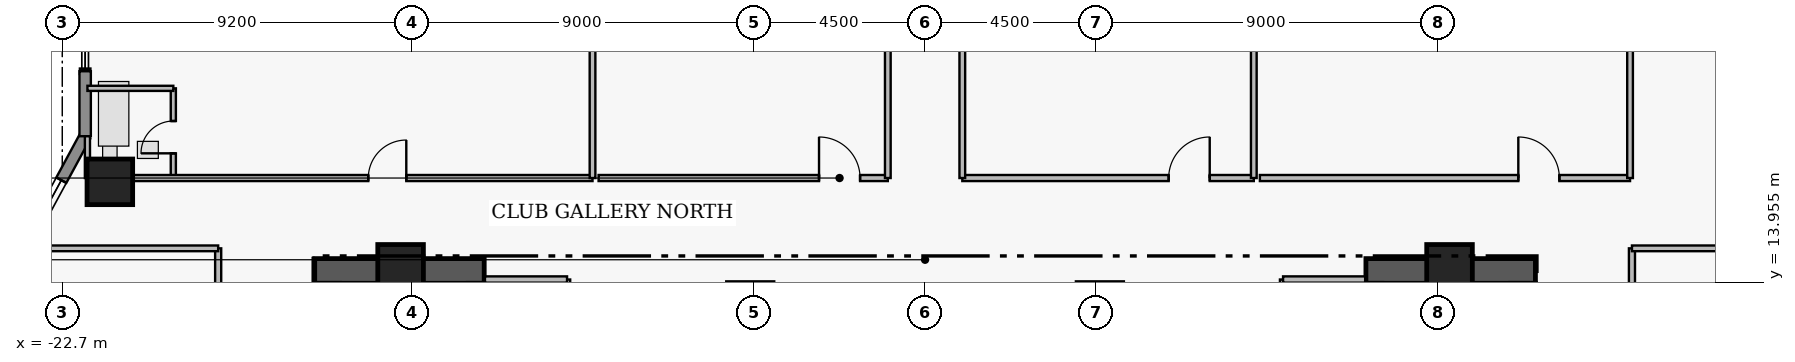
"""IFC4 building model, lengths in metres.
Left out: names, types, materials, properties, quantities, classifications, styles, units other than length and angle.
Written with IfcOpenShell. Run it as: python <this file> out.ifc"""

import sys

from ifc_helpers import new_model, si_unit, direction, frame, frame_2d, origin, origin_2d, place, context, subcontext, project, spatial, rectangle, extrude, element, fill, save


model = new_model("IFC4")
c1 = context("Model", 3, precision=1e-05, world=origin(), true_north=direction((0.0, 1.0)))
c2 = subcontext(c1, "Body", "Model", "MODEL_VIEW")
j1 = project(units=[si_unit("LENGTHUNIT", "METRE"), si_unit("PLANEANGLEUNIT", "RADIAN")], contexts=[c1])
p1 = place(None, origin())
s1 = spatial("IfcSite", under=j1, at=p1, CompositionType="ELEMENT")
p2 = place(p1, origin())
s2 = spatial("IfcBuilding", under=s1, at=p2, CompositionType="ELEMENT")
p3 = place(p2, frame((0.0, 0.0, 192.4)))
s3 = spatial("IfcBuildingStorey", under=s2, at=p3, CompositionType="ELEMENT", Elevation=192.4)
for number, where, z_axis, x_axis in (
    (1, (-16.06, 14.255, 0.0), (0.0, 0.0, 1.0), (1.0, 0.0, 0.0)),
    (2, (11.6, 14.255, 0.0), (0.0, 0.0, 1.0), (1.0, 0.0, 0.0)),
):
    element("IfcWall", number, at=place(p3, frame(where, z_axis=z_axis, x_axis=x_axis)), inside=s3, PredefinedType="SHEAR", context=c2, shape_type="SweptSolid", body=[
        extrude(rectangle(XDim=4.46, YDim=0.65, at=frame_2d((2.23, 0.0))), origin(), (0.0, 0.0, 1.0), 3.56),
    ])
for number, where, z_axis, x_axis in (
    (3, (-13.8, 14.35, 0.0), (0.0, 0.0, 1.0), (1.0, 0.0, 0.0)),
    (4, (-4.6, 13.35, 0.0), (0.0, 0.0, 1.0), (1.0, 0.0, 0.0)),
    (5, (4.6, 13.35, 0.0), (0.0, 0.0, 1.0), (1.0, 0.0, 0.0)),
    (6, (13.8, 14.35, 0.0), (0.0, 0.0, 1.0), (1.0, 0.0, 0.0)),
    (7, (-21.45, 16.6, 0.0), (0.0, 0.0, 1.0), (1.0, 0.0, 0.0)),
):
    element("IfcColumn", number, at=place(p3, frame(where, z_axis=z_axis, x_axis=x_axis)), inside=s3, PredefinedType="COLUMN", context=c2, shape_type="SweptSolid", body=[
        extrude(rectangle(XDim=1.2, YDim=1.2, at=origin_2d()), origin(), (0.0, 0.0, 1.0), 3.75),
    ])
p4 = place(p3, frame((-24.7, 13.0, 0.0), z_axis=(0.0, 0.0, 1.0), x_axis=(0.476258655584, 0.879305233114, 0.0)))
e8 = element("IfcWall", 8, at=p4, inside=s3, PredefinedType="STANDARD", context=c2, shape_type="SweptSolid", body=[
    extrude(rectangle(XDim=5.459, YDim=0.3, at=frame_2d((2.729, 0.0))), origin(), (0.0, 0.0, 1.0), 3.53),
])
p5 = place(p4, frame((2.993, 0.0, 1.25)))
e9 = element("IfcOpeningElement", 9, at=p5, cuts=e8, PredefinedType="OPENING", context=c2, shape_type="SweptSolid", body=[
    extrude(rectangle(XDim=1.15, YDim=1.55, at=frame_2d((0.575, 0.775))), frame((0.0, 0.16, 0.0), z_axis=(0.0, -1.0, 0.0), x_axis=(1.0, 0.0, 0.0)), (0.0, 0.0, 1.0), 0.32),
])
p6 = place(p3, frame((-22.1, 17.8, 0.0), z_axis=(0.0, 0.0, 1.0), x_axis=(0.0, 1.0, 0.0)))
e10 = element("IfcWall", 10, at=p6, inside=s3, PredefinedType="STANDARD", context=c2, shape_type="SweptSolid", body=[
    extrude(rectangle(XDim=1.71, YDim=0.3, at=frame_2d((0.855, 0.0))), origin(), (0.0, 0.0, 1.0), 3.53),
])
p7 = place(p3, frame((-19.78, 16.7, 0.0), z_axis=(0.0, 0.0, 1.0), x_axis=(0.0, 1.0, 0.0)))
e11 = element("IfcWall", 11, at=p7, inside=s3, PredefinedType="PLUMBINGWALL", context=c2, shape_type="SweptSolid", body=[
    extrude(rectangle(XDim=2.36, YDim=0.135, at=frame_2d((1.18, 0.0))), origin(), (0.0, 0.0, 1.0), 3.53),
])
p8 = place(p7, frame((0.65, 0.0, 0.0)))
e12 = element("IfcOpeningElement", 12, at=p8, cuts=e11, PredefinedType="OPENING", context=c2, shape_type="SweptSolid", body=[
    extrude(rectangle(XDim=0.85, YDim=2.1, at=frame_2d((0.425, 1.05))), frame((0.0, 0.077, 0.0), z_axis=(0.0, -1.0, 0.0), x_axis=(1.0, 0.0, 0.0)), (0.0, 0.0, 1.0), 0.155),
])
p9 = place(p3, frame((-22.04, 16.7, 0.0), z_axis=(0.0, 0.0, 1.0), x_axis=(1.0, 0.0, 0.0)))
e13 = element("IfcWall", 13, at=p9, inside=s3, PredefinedType="PARTITIONING", context=c2, shape_type="SweptSolid", body=[
    extrude(rectangle(XDim=13.29, YDim=0.16, at=frame_2d((6.645, 0.0))), origin(), (0.0, 0.0, 1.0), 3.124),
])
p10 = place(p9, frame((7.39, 0.0, 0.0)))
e14 = element("IfcOpeningElement", 14, at=p10, cuts=e13, PredefinedType="OPENING", context=c2, shape_type="SweptSolid", body=[
    extrude(rectangle(XDim=1.0, YDim=2.15, at=frame_2d((0.5, 1.075))), frame((0.0, 0.09, 0.0), z_axis=(0.0, -1.0, 0.0), x_axis=(1.0, 0.0, 0.0)), (0.0, 0.0, 1.0), 0.18),
])
p11 = place(p3, frame((-8.59, 16.7, 0.0), z_axis=(0.0, 0.0, 1.0), x_axis=(1.0, 0.0, 0.0)))
e15 = element("IfcWall", 15, at=p11, inside=s3, PredefinedType="PARTITIONING", context=c2, shape_type="SweptSolid", body=[
    extrude(rectangle(XDim=7.61, YDim=0.16, at=frame_2d((3.805, 0.0))), origin(), (0.0, 0.0, 1.0), 3.124),
])
p12 = place(p11, frame((5.8, 0.0, 0.0)))
e16 = element("IfcOpeningElement", 16, at=p12, cuts=e15, PredefinedType="OPENING", context=c2, shape_type="SweptSolid", body=[
    extrude(rectangle(XDim=1.08, YDim=2.18, at=frame_2d((0.54, 1.09))), frame((0.0, 0.09, 0.0), z_axis=(0.0, -1.0, 0.0), x_axis=(1.0, 0.0, 0.0)), (0.0, 0.0, 1.0), 0.18),
])
p13 = place(p3, frame((0.98, 16.7, 0.0), z_axis=(0.0, 0.0, 1.0), x_axis=(1.0, 0.0, 0.0)))
e17 = element("IfcWall", 17, at=p13, inside=s3, PredefinedType="PARTITIONING", context=c2, shape_type="SweptSolid", body=[
    extrude(rectangle(XDim=7.67, YDim=0.16, at=frame_2d((3.835, 0.0))), origin(), (0.0, 0.0, 1.0), 3.124),
])
p14 = place(p13, frame((5.43, 0.0, 0.0)))
e18 = element("IfcOpeningElement", 18, at=p14, cuts=e17, PredefinedType="OPENING", context=c2, shape_type="SweptSolid", body=[
    extrude(rectangle(XDim=1.08, YDim=2.18, at=frame_2d((0.54, 1.09))), frame((0.0, 0.09, 0.0), z_axis=(0.0, -1.0, 0.0), x_axis=(1.0, 0.0, 0.0)), (0.0, 0.0, 1.0), 0.18),
])
p15 = place(p3, frame((8.81, 16.7, 0.0), z_axis=(0.0, 0.0, 1.0), x_axis=(1.0, 0.0, 0.0)))
e19 = element("IfcWall", 19, at=p15, inside=s3, PredefinedType="PARTITIONING", context=c2, shape_type="SweptSolid", body=[
    extrude(rectangle(XDim=9.74, YDim=0.16, at=frame_2d((4.87, 0.0))), origin(), (0.0, 0.0, 1.0), 3.124),
])
p16 = place(p15, frame((6.8, 0.0, 0.0)))
e20 = element("IfcOpeningElement", 20, at=p16, cuts=e19, PredefinedType="OPENING", context=c2, shape_type="SweptSolid", body=[
    extrude(rectangle(XDim=1.08, YDim=2.18, at=frame_2d((0.54, 1.09))), frame((0.0, 0.09, 0.0), z_axis=(0.0, -1.0, 0.0), x_axis=(1.0, 0.0, 0.0)), (0.0, 0.0, 1.0), 0.18),
])
p17 = place(p3, frame((18.6, 6.91, 0.0), z_axis=(0.0, 0.0, 1.0), x_axis=(0.0, 1.0, 0.0)))
e21 = element("IfcWall", 21, at=p17, inside=s3, PredefinedType="PARTITIONING", context=c2, shape_type="SweptSolid", body=[
    extrude(rectangle(XDim=7.94, YDim=0.16, at=frame_2d((3.97, 0.0))), origin(), (0.0, 0.0, 1.0), 3.53),
])
p18 = place(p17, frame((3.51, 0.0, 0.0)))
e22 = element("IfcOpeningElement", 22, at=p18, cuts=e21, PredefinedType="OPENING", context=c2, shape_type="SweptSolid", body=[
    extrude(rectangle(XDim=0.92, YDim=2.12, at=frame_2d((0.46, 1.06))), frame((0.0, 0.09, 0.0), z_axis=(0.0, -1.0, 0.0), x_axis=(1.0, 0.0, 0.0)), (0.0, 0.0, 1.0), 0.18),
])
p19 = place(p3, frame((-18.6, 10.18, 0.0), z_axis=(0.0, 0.0, 1.0), x_axis=(0.0, 1.0, 0.0)))
e23 = element("IfcWall", 23, at=p19, inside=s3, PredefinedType="PARTITIONING", context=c2, shape_type="SweptSolid", body=[
    extrude(rectangle(XDim=4.67, YDim=0.16, at=frame_2d((2.335, 0.0))), origin(), (0.0, 0.0, 1.0), 3.53),
])
p20 = place(p19, frame((1.86, 0.0, 0.0)))
e24 = element("IfcOpeningElement", 24, at=p20, cuts=e23, PredefinedType="OPENING", context=c2, shape_type="SweptSolid", body=[
    extrude(rectangle(XDim=0.95, YDim=2.15, at=frame_2d((0.475, 1.075))), frame((0.0, 0.09, 0.0), z_axis=(0.0, -1.0, 0.0), x_axis=(1.0, 0.0, 0.0)), (0.0, 0.0, 1.0), 0.18),
])
p21 = place(p3, frame((-9.42, 11.07, 0.0), z_axis=(0.0, 0.0, 1.0), x_axis=(0.0, 1.0, 0.0)))
e25 = element("IfcWall", 25, at=p21, inside=s3, PredefinedType="PARTITIONING", context=c2, shape_type="SweptSolid", body=[
    extrude(rectangle(XDim=2.96, YDim=0.165, at=frame_2d((1.48, 0.0))), origin(), (0.0, 0.0, 1.0), 3.53),
])
p22 = place(p3, frame((-11.58, 14.03, 0.0), z_axis=(0.0, 0.0, 1.0), x_axis=(1.0, 0.0, 0.0)))
e26 = element("IfcWall", 26, at=p22, inside=s3, PredefinedType="PARTITIONING", context=c2, shape_type="SweptSolid", body=[
    extrude(rectangle(XDim=2.16, YDim=0.165, at=frame_2d((1.08, 0.0))), origin(), (0.0, 0.0, 1.0), 3.53),
])
p23 = place(p3, frame((9.42, 11.07, 0.0), z_axis=(0.0, 0.0, 1.0), x_axis=(0.0, 1.0, 0.0)))
e27 = element("IfcWall", 27, at=p23, inside=s3, PredefinedType="PARTITIONING", context=c2, shape_type="SweptSolid", body=[
    extrude(rectangle(XDim=2.96, YDim=0.165, at=frame_2d((1.48, 0.0))), origin(), (0.0, 0.0, 1.0), 3.53),
])
p24 = place(p3, frame((9.42, 14.03, 0.0), z_axis=(0.0, 0.0, 1.0), x_axis=(1.0, 0.0, 0.0)))
e28 = element("IfcWall", 28, at=p24, inside=s3, PredefinedType="PARTITIONING", context=c2, shape_type="SweptSolid", body=[
    extrude(rectangle(XDim=2.16, YDim=0.165, at=frame_2d((1.08, 0.0))), origin(), (0.0, 0.0, 1.0), 3.53),
])
p25 = place(p3, frame((-22.04, 19.06, 0.0), z_axis=(0.0, 0.0, 1.0), x_axis=(1.0, 0.0, 0.0)))
e29 = element("IfcWall", 29, at=p25, inside=s3, PredefinedType="PLUMBINGWALL", context=c2, shape_type="SweptSolid", body=[
    extrude(rectangle(XDim=2.26, YDim=0.135, at=frame_2d((1.13, 0.0))), origin(), (0.0, 0.0, 1.0), 3.53),
])
p26 = place(p3, frame((-22.04, 16.7, 0.0), z_axis=(0.0, 0.0, 1.0), x_axis=(0.0, 1.0, 0.0)))
e30 = element("IfcWall", 30, at=p26, inside=s3, PredefinedType="PLUMBINGWALL", context=c2, shape_type="SweptSolid", body=[
    extrude(rectangle(XDim=1.1, YDim=0.135, at=frame_2d((0.55, 0.0))), origin(), (0.0, 0.0, 1.0), 3.53),
])
for number, where, z_axis, x_axis in (
    (31, (-8.75, 16.7, 0.0), (0.0, 0.0, 1.0), (0.0, 1.0, 0.0)),
    (32, (-0.98, 16.7, 0.0), (0.0, 0.0, 1.0), (0.0, 1.0, 0.0)),
    (33, (0.98, 16.7, 0.0), (0.0, 0.0, 1.0), (0.0, 1.0, 0.0)),
    (34, (8.65, 16.7, 0.0), (0.0, 0.0, 1.0), (0.0, 1.0, 0.0)),
    (35, (18.55, 16.7, 0.0), (0.0, 0.0, 1.0), (0.0, 1.0, 0.0)),
):
    element("IfcWall", number, at=place(p3, frame(where, z_axis=z_axis, x_axis=x_axis)), inside=s3, PredefinedType="PARTITIONING", context=c2, shape_type="SweptSolid", body=[
        extrude(rectangle(XDim=8.3, YDim=0.15, at=frame_2d((4.15, 0.0))), origin(), (0.0, 0.0, 1.0), 3.53),
    ])
for number, where, z_axis, x_axis in (
    (36, (18.6, 14.85, 0.0), (0.0, 0.0, 1.0), (1.0, 0.0, 0.0)),
    (37, (-23.638, 14.85, 0.0), (0.0, 0.0, 1.0), (1.0, 0.0, 0.0)),
):
    element("IfcWall", number, at=place(p3, frame(where, z_axis=z_axis, x_axis=x_axis)), inside=s3, PredefinedType="PARTITIONING", context=c2, shape_type="SweptSolid", body=[
        extrude(rectangle(XDim=5.038, YDim=0.15, at=frame_2d((2.519, 0.0))), origin(), (0.0, 0.0, 1.0), 3.53),
    ])
p27 = place(p5, origin())
e38 = element("IfcWindow", 38, at=p27, inside=s3, PartitioningType="SINGLE_PANEL", PredefinedType="WINDOW", context=c2, shape_type="SweptSolid", body=[
    extrude(rectangle(XDim=1.15, YDim=1.55, at=frame_2d((0.575, 0.775))), frame((0.0, 0.03, 0.0), z_axis=(0.0, -1.0, 0.0), x_axis=(1.0, 0.0, 0.0)), (0.0, 0.0, 1.0), 0.06),
])
fill(e9, e38)
p28 = place(p8, origin())
e39 = element("IfcDoor", 39, at=p28, inside=s3, OperationType="SINGLE_SWING_LEFT", PredefinedType="DOOR", context=c2, shape_type="SweptSolid", body=[
    extrude(rectangle(XDim=0.85, YDim=2.1, at=frame_2d((0.425, 1.05))), frame((0.0, 0.025, 0.0), z_axis=(0.0, -1.0, 0.0), x_axis=(1.0, 0.0, 0.0)), (0.0, 0.0, 1.0), 0.05),
])
fill(e12, e39)
p29 = place(p10, origin())
e40 = element("IfcDoor", 40, at=p29, inside=s3, OperationType="SINGLE_SWING_RIGHT", PredefinedType="DOOR", context=c2, shape_type="SweptSolid", body=[
    extrude(rectangle(XDim=1.0, YDim=2.15, at=frame_2d((0.5, 1.075))), frame((0.0, 0.025, 0.0), z_axis=(0.0, -1.0, 0.0), x_axis=(1.0, 0.0, 0.0)), (0.0, 0.0, 1.0), 0.05),
])
fill(e14, e40)
p30 = place(p12, origin())
e41 = element("IfcDoor", 41, at=p30, inside=s3, OperationType="SINGLE_SWING_LEFT", PredefinedType="DOOR", context=c2, shape_type="SweptSolid", body=[
    extrude(rectangle(XDim=1.08, YDim=2.18, at=frame_2d((0.54, 1.09))), frame((0.0, 0.025, 0.0), z_axis=(0.0, -1.0, 0.0), x_axis=(1.0, 0.0, 0.0)), (0.0, 0.0, 1.0), 0.05),
])
fill(e16, e41)
p31 = place(p14, origin())
e42 = element("IfcDoor", 42, at=p31, inside=s3, OperationType="SINGLE_SWING_RIGHT", PredefinedType="DOOR", context=c2, shape_type="SweptSolid", body=[
    extrude(rectangle(XDim=1.08, YDim=2.18, at=frame_2d((0.54, 1.09))), frame((0.0, 0.025, 0.0), z_axis=(0.0, -1.0, 0.0), x_axis=(1.0, 0.0, 0.0)), (0.0, 0.0, 1.0), 0.05),
])
fill(e18, e42)
p32 = place(p16, origin())
e43 = element("IfcDoor", 43, at=p32, inside=s3, OperationType="SINGLE_SWING_LEFT", PredefinedType="DOOR", context=c2, shape_type="SweptSolid", body=[
    extrude(rectangle(XDim=1.08, YDim=2.18, at=frame_2d((0.54, 1.09))), frame((0.0, 0.025, 0.0), z_axis=(0.0, -1.0, 0.0), x_axis=(1.0, 0.0, 0.0)), (0.0, 0.0, 1.0), 0.05),
])
fill(e20, e43)
save(model, sys.argv[1])
